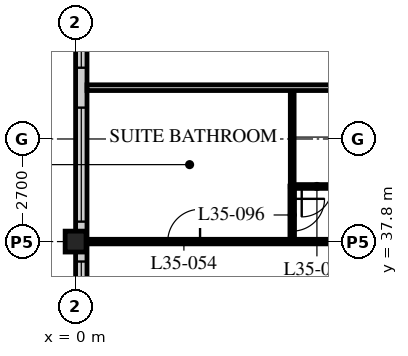
"""IFC4 building model, lengths in metres.
Left out: names, types, materials, properties, quantities, classifications, styles, units other than length and angle.
Written with IfcOpenShell. Run it as: python <this file> out.ifc"""

import sys

from ifc_helpers import new_model, si_unit, direction, frame, frame_2d, origin, origin_2d, place, context, subcontext, project, spatial, rectangle, hollow_rectangle, extrude, element, fill, save


model = new_model("IFC4")
c1 = context("Model", 3, precision=1e-05, world=origin(), true_north=direction((0.0, 1.0)))
c2 = subcontext(c1, "Body", "Model", "MODEL_VIEW")
j1 = project(units=[si_unit("LENGTHUNIT", "METRE"), si_unit("PLANEANGLEUNIT", "RADIAN")], contexts=[c1])
p1 = place(None, origin())
s1 = spatial("IfcSite", under=j1, at=p1, CompositionType="ELEMENT")
p2 = place(p1, origin())
s2 = spatial("IfcBuilding", under=s1, at=p2, CompositionType="ELEMENT")
p3 = place(p2, frame((0.0, 0.0, 137.4)))
s3 = spatial("IfcBuildingStorey", under=s2, at=p3, CompositionType="ELEMENT", Elevation=137.4)
p4 = place(p3, frame((0.0, 37.8, 0.0), z_axis=(0.0, 0.0, 1.0), x_axis=(1.0, 0.0, 0.0)))
e1 = element("IfcColumn", 1, at=p4, inside=s3, PredefinedType="COLUMN", context=c2, shape_type="SweptSolid", body=[
    extrude(hollow_rectangle(XDim=0.55, YDim=0.55, WallThickness=0.04, at=origin_2d()), origin(), (0.0, 0.0, 1.0), 3.4),
])
p5 = place(p3, frame((0.15, 45.6, 0.0), z_axis=(0.0, 0.0, 1.0), x_axis=(0.0, -1.0, 0.0)))
e2 = element("IfcWall", 2, at=p5, inside=s3, PredefinedType="SOLIDWALL", context=c2, shape_type="SweptSolid", body=[
    extrude(rectangle(XDim=32.1, YDim=0.3, at=frame_2d((16.05, 0.0))), origin(), (0.0, 0.0, 1.0), 3.19),
])
p6 = place(p5, frame((0.225, 0.0, 0.9)))
e3 = element("IfcOpeningElement", 3, at=p6, cuts=e2, PredefinedType="OPENING", context=c2, shape_type="SweptSolid", body=[
    extrude(rectangle(XDim=3.0, YDim=2.0, at=frame_2d((1.5, 1.0))), frame((0.0, 0.16, 0.0), z_axis=(0.0, -1.0, 0.0), x_axis=(1.0, 0.0, 0.0)), (0.0, 0.0, 1.0), 0.32),
])
p7 = place(p5, frame((4.275, 0.0, 0.9)))
e4 = element("IfcOpeningElement", 4, at=p7, cuts=e2, PredefinedType="OPENING", context=c2, shape_type="SweptSolid", body=[
    extrude(rectangle(XDim=3.0, YDim=2.0, at=frame_2d((1.5, 1.0))), frame((0.0, 0.16, 0.0), z_axis=(0.0, -1.0, 0.0), x_axis=(1.0, 0.0, 0.0)), (0.0, 0.0, 1.0), 0.32),
])
p8 = place(p5, frame((8.325, 0.0, 0.9)))
e5 = element("IfcOpeningElement", 5, at=p8, cuts=e2, PredefinedType="OPENING", context=c2, shape_type="SweptSolid", body=[
    extrude(rectangle(XDim=3.0, YDim=2.0, at=frame_2d((1.5, 1.0))), frame((0.0, 0.16, 0.0), z_axis=(0.0, -1.0, 0.0), x_axis=(1.0, 0.0, 0.0)), (0.0, 0.0, 1.0), 0.32),
])
p9 = place(p5, frame((12.375, 0.0, 0.9)))
e6 = element("IfcOpeningElement", 6, at=p9, cuts=e2, PredefinedType="OPENING", context=c2, shape_type="SweptSolid", body=[
    extrude(rectangle(XDim=3.0, YDim=2.0, at=frame_2d((1.5, 1.0))), frame((0.0, 0.16, 0.0), z_axis=(0.0, -1.0, 0.0), x_axis=(1.0, 0.0, 0.0)), (0.0, 0.0, 1.0), 0.32),
])
p10 = place(p5, frame((16.425, 0.0, 0.9)))
e7 = element("IfcOpeningElement", 7, at=p10, cuts=e2, PredefinedType="OPENING", context=c2, shape_type="SweptSolid", body=[
    extrude(rectangle(XDim=3.0, YDim=2.0, at=frame_2d((1.5, 1.0))), frame((0.0, 0.16, 0.0), z_axis=(0.0, -1.0, 0.0), x_axis=(1.0, 0.0, 0.0)), (0.0, 0.0, 1.0), 0.32),
])
p11 = place(p5, frame((20.475, 0.0, 0.9)))
e8 = element("IfcOpeningElement", 8, at=p11, cuts=e2, PredefinedType="OPENING", context=c2, shape_type="SweptSolid", body=[
    extrude(rectangle(XDim=3.0, YDim=2.0, at=frame_2d((1.5, 1.0))), frame((0.0, 0.16, 0.0), z_axis=(0.0, -1.0, 0.0), x_axis=(1.0, 0.0, 0.0)), (0.0, 0.0, 1.0), 0.32),
])
p12 = place(p5, frame((24.525, 0.0, 0.9)))
e9 = element("IfcOpeningElement", 9, at=p12, cuts=e2, PredefinedType="OPENING", context=c2, shape_type="SweptSolid", body=[
    extrude(rectangle(XDim=3.0, YDim=2.0, at=frame_2d((1.5, 1.0))), frame((0.0, 0.16, 0.0), z_axis=(0.0, -1.0, 0.0), x_axis=(1.0, 0.0, 0.0)), (0.0, 0.0, 1.0), 0.32),
])
p13 = place(p5, frame((28.575, 0.0, 0.9)))
e10 = element("IfcOpeningElement", 10, at=p13, cuts=e2, PredefinedType="OPENING", context=c2, shape_type="SweptSolid", body=[
    extrude(rectangle(XDim=3.0, YDim=2.0, at=frame_2d((1.5, 1.0))), frame((0.0, 0.16, 0.0), z_axis=(0.0, -1.0, 0.0), x_axis=(1.0, 0.0, 0.0)), (0.0, 0.0, 1.0), 0.32),
])
p14 = place(p3, frame((5.7, 39.25, 0.0), z_axis=(0.0, 0.0, 1.0), x_axis=(0.0, 1.0, 0.0)))
e11 = element("IfcWall", 11, at=p14, inside=s3, PredefinedType="PARTITIONING", context=c2, shape_type="SweptSolid", body=[
    extrude(rectangle(XDim=2.6, YDim=0.1, at=frame_2d((1.3, 0.0))), origin(), (0.0, 0.0, 1.0), 3.19),
])
p15 = place(p3, frame((8.1, 39.25, 0.0), z_axis=(0.0, 0.0, 1.0), x_axis=(-1.0, 0.0, 0.0)))
e12 = element("IfcWall", 12, at=p15, inside=s3, PredefinedType="PARTITIONING", context=c2, shape_type="SweptSolid", body=[
    extrude(rectangle(XDim=2.4, YDim=0.1, at=frame_2d((1.2, 0.0))), origin(), (0.0, 0.0, 1.0), 3.19),
])
p16 = place(p15, frame((1.35, 0.0, 0.0)))
e13 = element("IfcOpeningElement", 13, at=p16, cuts=e12, PredefinedType="OPENING", context=c2, shape_type="SweptSolid", body=[
    extrude(rectangle(XDim=0.8, YDim=2.1, at=frame_2d((0.4, 1.05))), frame((0.0, 0.06, 0.0), z_axis=(0.0, -1.0, 0.0), x_axis=(1.0, 0.0, 0.0)), (0.0, 0.0, 1.0), 0.12),
])
p17 = place(p3, frame((8.1, 37.8, 0.0), z_axis=(0.0, 0.0, 1.0), x_axis=(-1.0, 0.0, 0.0)))
e14 = element("IfcWall", 14, at=p17, inside=s3, PredefinedType="PARTITIONING", context=c2, shape_type="SweptSolid", body=[
    extrude(rectangle(XDim=7.8, YDim=0.12, at=frame_2d((3.9, 0.0))), origin(), (0.0, 0.0, 1.0), 2.578),
])
p18 = place(p17, frame((4.825, 0.0, 0.0)))
e15 = element("IfcOpeningElement", 15, at=p18, cuts=e14, PredefinedType="OPENING", context=c2, shape_type="SweptSolid", body=[
    extrude(rectangle(XDim=0.85, YDim=2.1, at=frame_2d((0.425, 1.05))), frame((0.0, 0.07, 0.0), z_axis=(0.0, -1.0, 0.0), x_axis=(1.0, 0.0, 0.0)), (0.0, 0.0, 1.0), 0.14),
])
p19 = place(p3, frame((8.1, 41.85, 0.0), z_axis=(0.0, 0.0, 1.0), x_axis=(-1.0, 0.0, 0.0)))
e16 = element("IfcWall", 16, at=p19, inside=s3, PredefinedType="PARTITIONING", context=c2, shape_type="SweptSolid", body=[
    extrude(rectangle(XDim=7.8, YDim=0.15, at=frame_2d((3.9, 0.0))), origin(), (0.0, 0.0, 1.0), 3.19),
])
p20 = place(p3, frame((5.7, 37.8, 0.0), z_axis=(0.0, 0.0, 1.0), x_axis=(0.0, 1.0, 0.0)))
e17 = element("IfcWall", 17, at=p20, inside=s3, PredefinedType="PARTITIONING", context=c2, shape_type="SweptSolid", body=[
    extrude(rectangle(XDim=1.46, YDim=0.12, at=frame_2d((0.73, 0.0))), origin(), (0.0, 0.0, 1.0), 3.19),
])
p21 = place(p20, frame((0.275, 0.0, 0.0)))
e18 = element("IfcOpeningElement", 18, at=p21, cuts=e17, PredefinedType="OPENING", context=c2, shape_type="SweptSolid", body=[
    extrude(rectangle(XDim=0.85, YDim=2.1, at=frame_2d((0.425, 1.05))), frame((0.0, 0.07, 0.0), z_axis=(0.0, -1.0, 0.0), x_axis=(1.0, 0.0, 0.0)), (0.0, 0.0, 1.0), 0.14),
])
p22 = place(p6, origin())
e19 = element("IfcWindow", 19, at=p22, inside=s3, PartitioningType="SINGLE_PANEL", PredefinedType="WINDOW", context=c2, shape_type="SweptSolid", body=[
    extrude(rectangle(XDim=3.0, YDim=2.0, at=frame_2d((1.5, 1.0))), frame((0.0, 0.03, 0.0), z_axis=(0.0, -1.0, 0.0), x_axis=(1.0, 0.0, 0.0)), (0.0, 0.0, 1.0), 0.06),
])
fill(e3, e19)
p23 = place(p7, origin())
e20 = element("IfcWindow", 20, at=p23, inside=s3, PartitioningType="SINGLE_PANEL", PredefinedType="WINDOW", context=c2, shape_type="SweptSolid", body=[
    extrude(rectangle(XDim=3.0, YDim=2.0, at=frame_2d((1.5, 1.0))), frame((0.0, 0.03, 0.0), z_axis=(0.0, -1.0, 0.0), x_axis=(1.0, 0.0, 0.0)), (0.0, 0.0, 1.0), 0.06),
])
fill(e4, e20)
p24 = place(p8, origin())
e21 = element("IfcWindow", 21, at=p24, inside=s3, PartitioningType="SINGLE_PANEL", PredefinedType="WINDOW", context=c2, shape_type="SweptSolid", body=[
    extrude(rectangle(XDim=3.0, YDim=2.0, at=frame_2d((1.5, 1.0))), frame((0.0, 0.03, 0.0), z_axis=(0.0, -1.0, 0.0), x_axis=(1.0, 0.0, 0.0)), (0.0, 0.0, 1.0), 0.06),
])
fill(e5, e21)
p25 = place(p16, origin())
e22 = element("IfcDoor", 22, at=p25, inside=s3, OperationType="SINGLE_SWING_RIGHT", PredefinedType="DOOR", context=c2, shape_type="SweptSolid", body=[
    extrude(rectangle(XDim=0.8, YDim=2.1, at=frame_2d((0.4, 1.05))), frame((0.0, 0.025, 0.0), z_axis=(0.0, -1.0, 0.0), x_axis=(1.0, 0.0, 0.0)), (0.0, 0.0, 1.0), 0.05),
])
fill(e13, e22)
p26 = place(p18, origin())
e23 = element("IfcDoor", 23, at=p26, inside=s3, OperationType="SINGLE_SWING_RIGHT", PredefinedType="DOOR", context=c2, shape_type="SweptSolid", body=[
    extrude(rectangle(XDim=0.85, YDim=2.1, at=frame_2d((0.425, 1.05))), frame((0.0, 0.025, 0.0), z_axis=(0.0, -1.0, 0.0), x_axis=(1.0, 0.0, 0.0)), (0.0, 0.0, 1.0), 0.05),
])
fill(e15, e23)
p27 = place(p21, origin())
e24 = element("IfcDoor", 24, at=p27, inside=s3, OperationType="SINGLE_SWING_LEFT", PredefinedType="DOOR", context=c2, shape_type="SweptSolid", body=[
    extrude(rectangle(XDim=0.85, YDim=2.1, at=frame_2d((0.425, 1.05))), frame((0.0, 0.025, 0.0), z_axis=(0.0, -1.0, 0.0), x_axis=(1.0, 0.0, 0.0)), (0.0, 0.0, 1.0), 0.05),
])
fill(e18, e24)
save(model, sys.argv[1])
